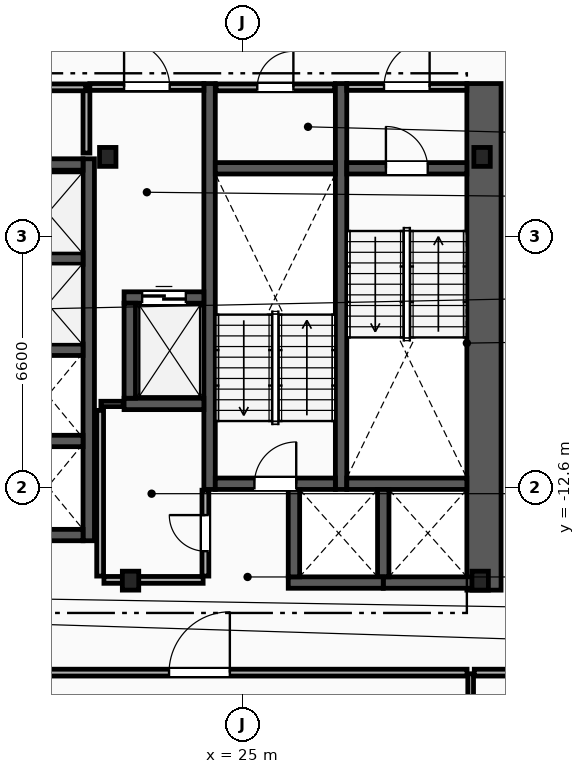
"""IFC4 building model, lengths in metres.
Left out: names, types, materials, properties, quantities, classifications, styles, units other than length and angle.
Written with IfcOpenShell. Run it as: python <this file> out.ifc"""

import sys

from ifc_helpers import new_model, si_unit, direction, frame, frame_2d, origin, origin_2d, place, context, subcontext, project, spatial, rectangle, i_section, extrude, element, fill, save


model = new_model("IFC4")
c1 = context("Model", 3, precision=1e-05, world=origin(), true_north=direction((0.0, 1.0)))
c2 = subcontext(c1, "Body", "Model", "MODEL_VIEW")
j1 = project(units=[si_unit("LENGTHUNIT", "METRE"), si_unit("PLANEANGLEUNIT", "RADIAN")], contexts=[c1])
p1 = place(None, origin())
s1 = spatial("IfcSite", under=j1, at=p1, CompositionType="ELEMENT")
p2 = place(p1, origin())
s2 = spatial("IfcBuilding", under=s1, at=p2, CompositionType="ELEMENT")
p3 = place(p2, frame((0.0, 0.0, 16.0)))
s3 = spatial("IfcBuildingStorey", under=s2, at=p3, CompositionType="ELEMENT", Elevation=16.0)
for number, where, z_axis, x_axis in (
    (1, (31.3, -3.9, 0.0), (0.0, 0.0, 1.0), (1.0, 0.0, 0.0)),
    (2, (21.45, -3.9, 0.0), (0.0, 0.0, 1.0), (1.0, 0.0, 0.0)),
    (3, (22.05, -15.05, 0.0), (0.0, 0.0, 1.0), (1.0, 0.0, 0.0)),
    (4, (31.25, -15.05, 0.0), (0.0, 0.0, 1.0), (1.0, 0.0, 0.0)),
):
    element("IfcColumn", number, at=place(p3, frame(where, z_axis=z_axis, x_axis=x_axis)), inside=s3, PredefinedType="COLUMN", context=c2, shape_type="SweptSolid", body=[
        extrude(i_section(OverallWidth=0.432, OverallDepth=0.498, WebThickness=0.056, FlangeThickness=0.089, FilletRadius=0.018, at=origin_2d()), origin(), (0.0, 0.0, 1.0), 4.0),
    ])
p4 = place(p3, frame((31.35, -15.3, 0.0), z_axis=(0.0, 0.0, 1.0), x_axis=(0.0, 1.0, 0.0)))
e5 = element("IfcWall", 5, at=p4, inside=s3, PredefinedType="SHEAR", context=c2, shape_type="SweptSolid", body=[
    extrude(rectangle(XDim=13.33, YDim=0.9, at=frame_2d((6.665, 0.0))), origin(), (0.0, 0.0, 1.0), 3.65),
])
for number, where, z_axis, x_axis in (
    (6, (27.59, -12.65, 0.0), (0.0, 0.0, 1.0), (0.0, 1.0, 0.0)),
    (7, (24.13, -12.65, 0.0), (0.0, 0.0, 1.0), (0.0, 1.0, 0.0)),
):
    element("IfcWall", number, at=place(p3, frame(where, z_axis=z_axis, x_axis=x_axis)), inside=s3, PredefinedType="SHEAR", context=c2, shape_type="SweptSolid", body=[
        extrude(rectangle(XDim=10.68, YDim=0.3, at=frame_2d((5.34, 0.0))), origin(), (0.0, 0.0, 1.0), 3.65),
    ])
p5 = place(p3, frame((27.74, -4.2, 0.0), z_axis=(0.0, 0.0, 1.0), x_axis=(1.0, 0.0, 0.0)))
e8 = element("IfcWall", 8, at=p5, inside=s3, PredefinedType="SHEAR", context=c2, shape_type="SweptSolid", body=[
    extrude(rectangle(XDim=3.16, YDim=0.3, at=frame_2d((1.58, 0.0))), origin(), (0.0, 0.0, 1.0), 3.65),
])
p6 = place(p5, frame((1.03, 0.0, 0.0)))
e9 = element("IfcOpeningElement", 9, at=p6, cuts=e8, PredefinedType="OPENING", context=c2, shape_type="SweptSolid", body=[
    extrude(rectangle(XDim=1.1, YDim=2.15, at=frame_2d((0.55, 1.075))), frame((0.0, 0.16, 0.0), z_axis=(0.0, -1.0, 0.0), x_axis=(1.0, 0.0, 0.0)), (0.0, 0.0, 1.0), 0.32),
])
p7 = place(p3, frame((27.74, -12.5, 0.0), z_axis=(0.0, 0.0, 1.0), x_axis=(1.0, 0.0, 0.0)))
e10 = element("IfcWall", 10, at=p7, inside=s3, PredefinedType="SHEAR", context=c2, shape_type="SweptSolid", body=[
    extrude(rectangle(XDim=3.16, YDim=0.3, at=frame_2d((1.58, 0.0))), origin(), (0.0, 0.0, 1.0), 3.65),
])
p8 = place(p3, frame((24.28, -12.5, 0.0), z_axis=(0.0, 0.0, 1.0), x_axis=(1.0, 0.0, 0.0)))
e11 = element("IfcWall", 11, at=p8, inside=s3, PredefinedType="SHEAR", context=c2, shape_type="SweptSolid", body=[
    extrude(rectangle(XDim=3.16, YDim=0.3, at=frame_2d((1.58, 0.0))), origin(), (0.0, 0.0, 1.0), 3.65),
])
p9 = place(p8, frame((1.03, 0.0, 0.0)))
e12 = element("IfcOpeningElement", 12, at=p9, cuts=e11, PredefinedType="OPENING", context=c2, shape_type="SweptSolid", body=[
    extrude(rectangle(XDim=1.1, YDim=2.15, at=frame_2d((0.55, 1.075))), frame((0.0, 0.16, 0.0), z_axis=(0.0, -1.0, 0.0), x_axis=(1.0, 0.0, 0.0)), (0.0, 0.0, 1.0), 0.32),
])
p10 = place(p3, frame((24.28, -4.2, 0.0), z_axis=(0.0, 0.0, 1.0), x_axis=(1.0, 0.0, 0.0)))
e13 = element("IfcWall", 13, at=p10, inside=s3, PredefinedType="SHEAR", context=c2, shape_type="SweptSolid", body=[
    extrude(rectangle(XDim=3.16, YDim=0.3, at=frame_2d((1.58, 0.0))), origin(), (0.0, 0.0, 1.0), 3.65),
])
p11 = place(p3, frame((20.89, -3.8, 0.0), z_axis=(0.0, 0.0, 1.0), x_axis=(0.0, 1.0, 0.0)))
e14 = element("IfcWall", 14, at=p11, inside=s3, PredefinedType="PARTITIONING", context=c2, shape_type="SweptSolid", body=[
    extrude(rectangle(XDim=1.65, YDim=0.18, at=frame_2d((0.825, 0.0))), origin(), (0.0, 0.0, 1.0), 3.65),
])
p12 = place(p3, frame((20.98, -2.06, 0.0), z_axis=(0.0, 0.0, 1.0), x_axis=(1.0, 0.0, 0.0)))
e15 = element("IfcWall", 15, at=p12, inside=s3, PredefinedType="PARTITIONING", context=c2, shape_type="SweptSolid", body=[
    extrude(rectangle(XDim=3.0, YDim=0.18, at=frame_2d((1.5, 0.0))), origin(), (0.0, 0.0, 1.0), 3.65),
])
p13 = place(p12, frame((0.9, 0.0, 0.0)))
e16 = element("IfcOpeningElement", 16, at=p13, cuts=e15, PredefinedType="OPENING", context=c2, shape_type="SweptSolid", body=[
    extrude(rectangle(XDim=1.2, YDim=2.15, at=frame_2d((0.6, 1.075))), frame((0.0, 0.1, 0.0), z_axis=(0.0, -1.0, 0.0), x_axis=(1.0, 0.0, 0.0)), (0.0, 0.0, 1.0), 0.2),
])
p14 = place(p3, frame((27.74, -2.06, 0.0), z_axis=(0.0, 0.0, 1.0), x_axis=(1.0, 0.0, 0.0)))
e17 = element("IfcWall", 17, at=p14, inside=s3, PredefinedType="PARTITIONING", context=c2, shape_type="SweptSolid", body=[
    extrude(rectangle(XDim=3.16, YDim=0.18, at=frame_2d((1.58, 0.0))), origin(), (0.0, 0.0, 1.0), 3.65),
])
p15 = place(p14, frame((0.98, 0.0, 0.0)))
e18 = element("IfcOpeningElement", 18, at=p15, cuts=e17, PredefinedType="OPENING", context=c2, shape_type="SweptSolid", body=[
    extrude(rectangle(XDim=1.2, YDim=2.15, at=frame_2d((0.6, 1.075))), frame((0.0, 0.1, 0.0), z_axis=(0.0, -1.0, 0.0), x_axis=(1.0, 0.0, 0.0)), (0.0, 0.0, 1.0), 0.2),
])
p16 = place(p3, frame((21.88, -7.6, 0.0), z_axis=(0.0, 0.0, 1.0), x_axis=(1.0, 0.0, 0.0)))
e19 = element("IfcWall", 19, at=p16, inside=s3, PredefinedType="SHEAR", context=c2, shape_type="SweptSolid", body=[
    extrude(rectangle(XDim=2.1, YDim=0.3, at=frame_2d((1.05, 0.0))), origin(), (0.0, 0.0, 1.0), 3.65),
])
p17 = place(p16, frame((0.475, 0.0, 0.0)))
e20 = element("IfcOpeningElement", 20, at=p17, cuts=e19, PredefinedType="OPENING", context=c2, shape_type="SweptSolid", body=[
    extrude(rectangle(XDim=1.15, YDim=2.2, at=frame_2d((0.575, 1.1))), frame((0.0, 0.16, 0.0), z_axis=(0.0, -1.0, 0.0), x_axis=(1.0, 0.0, 0.0)), (0.0, 0.0, 1.0), 0.32),
])
p18 = place(p3, frame((21.88, -10.4, 0.0), z_axis=(0.0, 0.0, 1.0), x_axis=(1.0, 0.0, 0.0)))
e21 = element("IfcWall", 21, at=p18, inside=s3, PredefinedType="SHEAR", context=c2, shape_type="SweptSolid", body=[
    extrude(rectangle(XDim=2.1, YDim=0.3, at=frame_2d((1.05, 0.0))), origin(), (0.0, 0.0, 1.0), 3.65),
])
for number, where, z_axis, x_axis in (
    (22, (22.03, -10.25, 0.0), (0.0, 0.0, 1.0), (0.0, 1.0, 0.0)),
    (23, (28.7, -15.1, 0.0), (0.0, 0.0, 1.0), (1.0, 0.0, 0.0)),
):
    element("IfcWall", number, at=place(p3, frame(where, z_axis=z_axis, x_axis=x_axis)), inside=s3, PredefinedType="SHEAR", context=c2, shape_type="SweptSolid", body=[
        extrude(rectangle(XDim=2.5, YDim=0.3, at=frame_2d((1.25, 0.0))), origin(), (0.0, 0.0, 1.0), 3.65),
    ])
p19 = place(p3, frame((28.7, -14.95, 0.0), z_axis=(0.0, 0.0, 1.0), x_axis=(0.0, 1.0, 0.0)))
e24 = element("IfcWall", 24, at=p19, inside=s3, PredefinedType="SHEAR", context=c2, shape_type="SweptSolid", body=[
    extrude(rectangle(XDim=2.3, YDim=0.3, at=frame_2d((1.15, 0.0))), origin(), (0.0, 0.0, 1.0), 3.65),
])
p20 = place(p3, frame((26.2, -15.1, 0.0), z_axis=(0.0, 0.0, 1.0), x_axis=(1.0, 0.0, 0.0)))
e25 = element("IfcWall", 25, at=p20, inside=s3, PredefinedType="SHEAR", context=c2, shape_type="SweptSolid", body=[
    extrude(rectangle(XDim=2.5, YDim=0.3, at=frame_2d((1.25, 0.0))), origin(), (0.0, 0.0, 1.0), 3.65),
])
p21 = place(p3, frame((26.35, -14.95, 0.0), z_axis=(0.0, 0.0, 1.0), x_axis=(0.0, 1.0, 0.0)))
e26 = element("IfcWall", 26, at=p21, inside=s3, PredefinedType="SHEAR", context=c2, shape_type="SweptSolid", body=[
    extrude(rectangle(XDim=2.3, YDim=0.3, at=frame_2d((1.15, 0.0))), origin(), (0.0, 0.0, 1.0), 3.65),
])
p22 = place(p3, frame((20.95, -14.0, 0.0), z_axis=(0.0, 0.0, 1.0), x_axis=(0.0, 1.0, 0.0)))
e27 = element("IfcWall", 27, at=p22, inside=s3, PredefinedType="SHEAR", context=c2, shape_type="SweptSolid", body=[
    extrude(rectangle(XDim=10.05, YDim=0.3, at=frame_2d((5.025, 0.0))), origin(), (0.0, 0.0, 1.0), 3.65),
])
p23 = place(p3, frame((18.95, -13.85, 0.0), z_axis=(0.0, 0.0, 1.0), x_axis=(1.0, 0.0, 0.0)))
e28 = element("IfcWall", 28, at=p23, inside=s3, PredefinedType="SHEAR", context=c2, shape_type="SweptSolid", body=[
    extrude(rectangle(XDim=1.85, YDim=0.3, at=frame_2d((0.925, 0.0))), origin(), (0.0, 0.0, 1.0), 3.65),
])
p24 = place(p3, frame((18.65, -4.1, 0.0), z_axis=(0.0, 0.0, 1.0), x_axis=(1.0, 0.0, 0.0)))
e29 = element("IfcWall", 29, at=p24, inside=s3, PredefinedType="SHEAR", context=c2, shape_type="SweptSolid", body=[
    extrude(rectangle(XDim=2.15, YDim=0.3, at=frame_2d((1.075, 0.0))), origin(), (0.0, 0.0, 1.0), 3.65),
])
for number, where, z_axis, x_axis in (
    (30, (18.95, -11.375, 0.0), (0.0, 0.0, 1.0), (1.0, 0.0, 0.0)),
    (31, (18.95, -8.975, 0.0), (0.0, 0.0, 1.0), (1.0, 0.0, 0.0)),
    (32, (18.95, -6.575, 0.0), (0.0, 0.0, 1.0), (1.0, 0.0, 0.0)),
):
    element("IfcWall", number, at=place(p3, frame(where, z_axis=z_axis, x_axis=x_axis)), inside=s3, PredefinedType="SHEAR", context=c2, shape_type="SweptSolid", body=[
        extrude(rectangle(XDim=1.85, YDim=0.3, at=frame_2d((0.925, 0.0))), origin(), (0.0, 0.0, 1.0), 3.65),
    ])
p25 = place(p3, frame((17.12, -2.07, 0.0), z_axis=(0.0, 0.0, 1.0), x_axis=(1.0, 0.0, 0.0)))
e33 = element("IfcWall", 33, at=p25, inside=s3, PredefinedType="PARTITIONING", context=c2, shape_type="SweptSolid", body=[
    extrude(rectangle(XDim=3.75, YDim=0.18, at=frame_2d((1.875, 0.0))), origin(), (0.0, 0.0, 1.0), 3.65),
])
p26 = place(p25, frame((1.4, 0.0, 0.0)))
e34 = element("IfcOpeningElement", 34, at=p26, cuts=e33, PredefinedType="OPENING", context=c2, shape_type="SweptSolid", body=[
    extrude(rectangle(XDim=0.95, YDim=2.1, at=frame_2d((0.475, 1.05))), frame((0.0, 0.1, 0.0), z_axis=(0.0, -1.0, 0.0), x_axis=(1.0, 0.0, 0.0)), (0.0, 0.0, 1.0), 0.2),
])
p27 = place(p3, frame((21.27, -10.4, 0.0), z_axis=(0.0, 0.0, 1.0), x_axis=(1.0, 0.0, 0.0)))
e35 = element("IfcWall", 35, at=p27, inside=s3, PredefinedType="PARTITIONING", context=c2, shape_type="SweptSolid", body=[
    extrude(rectangle(XDim=0.59, YDim=0.14, at=frame_2d((0.295, 0.0))), origin(), (0.0, 0.0, 1.0), 3.65),
])
p28 = place(p3, frame((21.25, -14.93, 0.0), z_axis=(0.0, 0.0, 1.0), x_axis=(0.0, 1.0, 0.0)))
e36 = element("IfcWall", 36, at=p28, inside=s3, PredefinedType="PARTITIONING", context=c2, shape_type="SweptSolid", body=[
    extrude(rectangle(XDim=4.36, YDim=0.18, at=frame_2d((2.18, 0.0))), origin(), (0.0, 0.0, 1.0), 3.65),
])
p29 = place(p3, frame((21.35, -15.03, 0.0), z_axis=(0.0, 0.0, 1.0), x_axis=(1.0, 0.0, 0.0)))
e37 = element("IfcWall", 37, at=p29, inside=s3, PredefinedType="PARTITIONING", context=c2, shape_type="SweptSolid", body=[
    extrude(rectangle(XDim=2.61, YDim=0.18, at=frame_2d((1.305, 0.0))), origin(), (0.0, 0.0, 1.0), 2.723),
])
p30 = place(p3, frame((24.3, -2.07, 0.0), z_axis=(0.0, 0.0, 1.0), x_axis=(1.0, 0.0, 0.0)))
e38 = element("IfcWall", 38, at=p30, inside=s3, PredefinedType="PARTITIONING", context=c2, shape_type="SweptSolid", body=[
    extrude(rectangle(XDim=3.12, YDim=0.18, at=frame_2d((1.56, 0.0))), origin(), (0.0, 0.0, 1.0), 3.65),
])
p31 = place(p30, frame((1.085, 0.0, 0.0)))
e39 = element("IfcOpeningElement", 39, at=p31, cuts=e38, PredefinedType="OPENING", context=c2, shape_type="SweptSolid", body=[
    extrude(rectangle(XDim=0.95, YDim=2.1, at=frame_2d((0.475, 1.05))), frame((0.0, 0.1, 0.0), z_axis=(0.0, -1.0, 0.0), x_axis=(1.0, 0.0, 0.0)), (0.0, 0.0, 1.0), 0.2),
])
p32 = place(p3, frame((24.02, -14.93, 0.0), z_axis=(0.0, 0.0, 1.0), x_axis=(0.0, 1.0, 0.0)))
e40 = element("IfcWall", 40, at=p32, inside=s3, PredefinedType="PARTITIONING", context=c2, shape_type="SweptSolid", body=[
    extrude(rectangle(XDim=2.26, YDim=0.18, at=frame_2d((1.13, 0.0))), origin(), (0.0, 0.0, 1.0), 3.65),
])
p33 = place(p32, frame((0.655, 0.0, 0.0)))
e41 = element("IfcOpeningElement", 41, at=p33, cuts=e40, PredefinedType="OPENING", context=c2, shape_type="SweptSolid", body=[
    extrude(rectangle(XDim=0.95, YDim=2.1, at=frame_2d((0.475, 1.05))), frame((0.0, 0.1, 0.0), z_axis=(0.0, -1.0, 0.0), x_axis=(1.0, 0.0, 0.0)), (0.0, 0.0, 1.0), 0.2),
])
p34 = place(p3, frame((31.0, -25.971, 0.0), z_axis=(0.0, 0.0, 1.0), x_axis=(0.0, 1.0, 0.0)))
e42 = element("IfcWall", 42, at=p34, inside=s3, PredefinedType="PARTITIONING", context=c2, shape_type="SweptSolid", body=[
    extrude(rectangle(XDim=8.471, YDim=0.15, at=frame_2d((4.236, 0.0))), origin(), (0.0, 0.0, 1.0), 3.65),
])
p35 = place(p34, frame((3.236, 0.0, 1.05)))
e43 = element("IfcOpeningElement", 43, at=p35, cuts=e42, PredefinedType="OPENING", context=c2, shape_type="SweptSolid", body=[
    extrude(rectangle(XDim=2.0, YDim=1.5, at=frame_2d((1.0, 0.75))), frame((0.0, 0.085, 0.0), z_axis=(0.0, -1.0, 0.0), x_axis=(1.0, 0.0, 0.0)), (0.0, 0.0, 1.0), 0.17),
])
p36 = place(p3, frame((16.822, -17.47, 0.0), z_axis=(0.0, 0.0, 1.0), x_axis=(1.0, 0.0, 0.0)))
e44 = element("IfcWall", 44, at=p36, inside=s3, PredefinedType="PARTITIONING", context=c2, shape_type="SweptSolid", body=[
    extrude(rectangle(XDim=14.083, YDim=0.18, at=frame_2d((7.042, 0.0))), origin(), (0.0, 0.0, 1.0), 3.65),
])
p37 = place(p36, frame((6.242, 0.0, 0.0)))
e45 = element("IfcOpeningElement", 45, at=p37, cuts=e44, PredefinedType="OPENING", context=c2, shape_type="SweptSolid", body=[
    extrude(rectangle(XDim=1.6, YDim=2.2, at=frame_2d((0.8, 1.1))), frame((0.0, 0.1, 0.0), z_axis=(0.0, -1.0, 0.0), x_axis=(1.0, 0.0, 0.0)), (0.0, 0.0, 1.0), 0.2),
])
p38 = place(p3, frame((31.095, -17.47, 0.0), z_axis=(0.0, 0.0, 1.0), x_axis=(1.0, 0.0, 0.0)))
e46 = element("IfcWall", 46, at=p38, inside=s3, PredefinedType="PARTITIONING", context=c2, shape_type="SweptSolid", body=[
    extrude(rectangle(XDim=2.533, YDim=0.18, at=frame_2d((1.267, 0.0))), origin(), (0.0, 0.0, 1.0), 2.877),
])
p39 = place(p6, origin())
e47 = element("IfcDoor", 47, at=p39, inside=s3, OperationType="SINGLE_SWING_LEFT", PredefinedType="DOOR", context=c2, shape_type="SweptSolid", body=[
    extrude(rectangle(XDim=1.1, YDim=2.15, at=frame_2d((0.55, 1.075))), frame((0.0, 0.025, 0.0), z_axis=(0.0, -1.0, 0.0), x_axis=(1.0, 0.0, 0.0)), (0.0, 0.0, 1.0), 0.05),
])
fill(e9, e47)
p40 = place(p9, origin())
e48 = element("IfcDoor", 48, at=p40, inside=s3, OperationType="SINGLE_SWING_RIGHT", PredefinedType="DOOR", context=c2, shape_type="SweptSolid", body=[
    extrude(rectangle(XDim=1.1, YDim=2.15, at=frame_2d((0.55, 1.075))), frame((0.0, 0.025, 0.0), z_axis=(0.0, -1.0, 0.0), x_axis=(1.0, 0.0, 0.0)), (0.0, 0.0, 1.0), 0.05),
])
fill(e12, e48)
p41 = place(p13, origin())
e49 = element("IfcDoor", 49, at=p41, inside=s3, OperationType="SINGLE_SWING_LEFT", PredefinedType="DOOR", context=c2, shape_type="SweptSolid", body=[
    extrude(rectangle(XDim=1.2, YDim=2.15, at=frame_2d((0.6, 1.075))), frame((0.0, 0.025, 0.0), z_axis=(0.0, -1.0, 0.0), x_axis=(1.0, 0.0, 0.0)), (0.0, 0.0, 1.0), 0.05),
])
fill(e16, e49)
p42 = place(p15, origin())
e50 = element("IfcDoor", 50, at=p42, inside=s3, OperationType="SINGLE_SWING_RIGHT", PredefinedType="DOOR", context=c2, shape_type="SweptSolid", body=[
    extrude(rectangle(XDim=1.2, YDim=2.15, at=frame_2d((0.6, 1.075))), frame((0.0, 0.025, 0.0), z_axis=(0.0, -1.0, 0.0), x_axis=(1.0, 0.0, 0.0)), (0.0, 0.0, 1.0), 0.05),
])
fill(e18, e50)
p43 = place(p17, origin())
e51 = element("IfcDoor", 51, at=p43, inside=s3, OperationType="SLIDING_TO_LEFT", PredefinedType="TRAPDOOR", context=c2, shape_type="SweptSolid", body=[
    extrude(rectangle(XDim=1.15, YDim=2.2, at=frame_2d((0.575, 1.1))), frame((0.0, 0.025, 0.0), z_axis=(0.0, -1.0, 0.0), x_axis=(1.0, 0.0, 0.0)), (0.0, 0.0, 1.0), 0.05),
])
fill(e20, e51)
p44 = place(p37, origin())
e52 = element("IfcDoor", 52, at=p44, inside=s3, OperationType="SINGLE_SWING_RIGHT", PredefinedType="DOOR", context=c2, shape_type="SweptSolid", body=[
    extrude(rectangle(XDim=1.6, YDim=2.2, at=frame_2d((0.8, 1.1))), frame((0.0, 0.025, 0.0), z_axis=(0.0, -1.0, 0.0), x_axis=(1.0, 0.0, 0.0)), (0.0, 0.0, 1.0), 0.05),
])
fill(e45, e52)
p45 = place(p31, origin())
e53 = element("IfcDoor", 53, at=p45, inside=s3, OperationType="SINGLE_SWING_RIGHT", PredefinedType="DOOR", context=c2, shape_type="SweptSolid", body=[
    extrude(rectangle(XDim=0.95, YDim=2.1, at=frame_2d((0.475, 1.05))), frame((0.0, 0.025, 0.0), z_axis=(0.0, -1.0, 0.0), x_axis=(1.0, 0.0, 0.0)), (0.0, 0.0, 1.0), 0.05),
])
fill(e39, e53)
p46 = place(p33, origin())
e54 = element("IfcDoor", 54, at=p46, inside=s3, OperationType="SINGLE_SWING_RIGHT", PredefinedType="DOOR", context=c2, shape_type="SweptSolid", body=[
    extrude(rectangle(XDim=0.95, YDim=2.1, at=frame_2d((0.475, 1.05))), frame((0.0, 0.025, 0.0), z_axis=(0.0, -1.0, 0.0), x_axis=(1.0, 0.0, 0.0)), (0.0, 0.0, 1.0), 0.05),
])
fill(e41, e54)
save(model, sys.argv[1])
